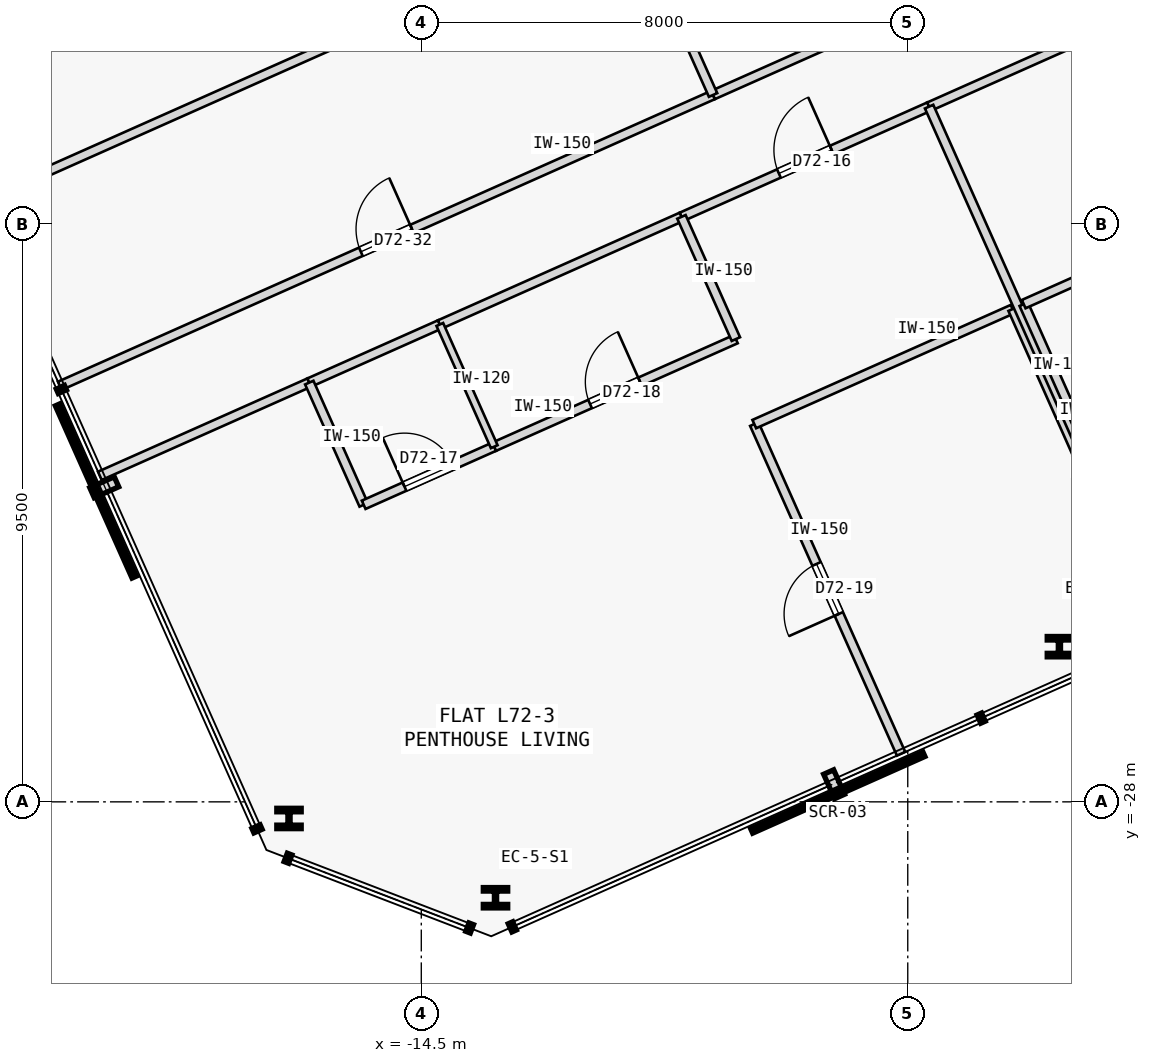
"""IFC4 building model, lengths in metres.
Left out: names, types, materials, properties, quantities, classifications, styles, units other than length and angle.
Written with IfcOpenShell. Run it as: python <this file> out.ifc"""

import sys

from ifc_helpers import new_model, si_unit, direction, frame, frame_2d, origin, origin_2d, place, context, subcontext, project, spatial, rectangle, i_section, extrude, element, fill, save


model = new_model("IFC4")
c1 = context("Model", 3, precision=1e-05, world=origin(), true_north=direction((0.0, 1.0)))
c2 = subcontext(c1, "Body", "Model", "MODEL_VIEW")
j1 = project(units=[si_unit("LENGTHUNIT", "METRE"), si_unit("PLANEANGLEUNIT", "RADIAN")], contexts=[c1])
p1 = place(None, origin())
s1 = spatial("IfcSite", under=j1, at=p1, CompositionType="ELEMENT")
p2 = place(p1, origin())
s2 = spatial("IfcBuilding", under=s1, at=p2, CompositionType="ELEMENT")
p3 = place(p2, frame((0.0, 0.0, 268.9)))
s3 = spatial("IfcBuildingStorey", under=s2, at=p3, CompositionType="ELEMENT", Elevation=268.9)
for number, where, z_axis, x_axis in (
    (1, (-13.28, -29.577, 0.0), (0.0, 0.0, 1.0), (1.0, 0.0, 0.0)),
    (2, (-4.006, -25.448, 0.0), (0.0, 0.0, 1.0), (1.0, 0.0, 0.0)),
    (3, (-16.676, -28.273, 0.0), (0.0, 0.0, 1.0), (1.0, 0.0, 0.0)),
):
    element("IfcColumn", number, at=place(p3, frame(where, z_axis=z_axis, x_axis=x_axis)), inside=s3, PredefinedType="COLUMN", context=c2, shape_type="SweptSolid", body=[
        extrude(i_section(OverallWidth=0.401, OverallDepth=0.335, WebThickness=0.036, FlangeThickness=0.058, FilletRadius=0.015, at=origin_2d()), origin(), (0.0, 0.0, 1.0), 3.35),
    ])
p4 = place(p3, frame((-19.786, -22.639, 0.0), z_axis=(0.0, 0.0, 1.0), x_axis=(0.913541633228, 0.406745232743, 0.0)))
e4 = element("IfcWall", 4, at=p4, inside=s3, PredefinedType="PARTITIONING", context=c2, shape_type="SweptSolid", body=[
    extrude(rectangle(XDim=3.77, YDim=0.15, at=frame_2d((1.885, 0.0))), origin(), (0.0, 0.0, 1.0), 3.125),
])
p5 = place(p3, frame((-10.221, -18.38, 0.0), z_axis=(0.0, 0.0, 1.0), x_axis=(0.913542602601, 0.406743055543, 0.0)))
e5 = element("IfcWall", 5, at=p5, inside=s3, PredefinedType="PARTITIONING", context=c2, shape_type="SweptSolid", body=[
    extrude(rectangle(XDim=4.458, YDim=0.15, at=frame_2d((2.229, 0.0))), origin(), (0.0, 0.0, 1.0), 3.125),
])
p6 = place(p5, frame((1.754, 0.0, 0.0)))
e6 = element("IfcOpeningElement", 6, at=p6, cuts=e5, PredefinedType="OPENING", context=c2, shape_type="SweptSolid", body=[
    extrude(rectangle(XDim=0.95, YDim=2.15, at=frame_2d((0.475, 1.075))), frame((0.0, 0.085, 0.0), z_axis=(0.0, -1.0, 0.0), x_axis=(1.0, 0.0, 0.0)), (0.0, 0.0, 1.0), 0.17),
])
p7 = place(p3, frame((-16.342, -21.105, 0.0), z_axis=(0.0, 0.0, 1.0), x_axis=(0.913558622212, 0.406707073682, 0.0)))
e7 = element("IfcWall", 7, at=p7, inside=s3, PredefinedType="PARTITIONING", context=c2, shape_type="SweptSolid", body=[
    extrude(rectangle(XDim=2.35, YDim=0.15, at=frame_2d((1.175, 0.0))), origin(), (0.0, 0.0, 1.0), 3.125),
])
p8 = place(p3, frame((-14.195, -20.149, 0.0), z_axis=(0.0, 0.0, 1.0), x_axis=(0.913545193015, 0.406737237438, 0.0)))
e8 = element("IfcWall", 8, at=p8, inside=s3, PredefinedType="PARTITIONING", context=c2, shape_type="SweptSolid", body=[
    extrude(rectangle(XDim=4.35, YDim=0.15, at=frame_2d((2.175, 0.0))), origin(), (0.0, 0.0, 1.0), 3.125),
])
p9 = place(p3, frame((-6.149, -16.567, 0.0), z_axis=(0.0, 0.0, 1.0), x_axis=(0.913543802, 0.40674036169, 0.0)))
e9 = element("IfcWall", 9, at=p9, inside=s3, PredefinedType="PARTITIONING", context=c2, shape_type="SweptSolid", body=[
    extrude(rectangle(XDim=3.65, YDim=0.15, at=frame_2d((1.825, 0.0))), origin(), (0.0, 0.0, 1.0), 3.125),
])
p10 = place(p3, frame((-20.445, -21.159, 0.0), z_axis=(0.0, 0.0, 1.0), x_axis=(0.913547681516, 0.406731648137, 0.0)))
e10 = element("IfcWall", 10, at=p10, inside=s3, PredefinedType="PARTITIONING", context=c2, shape_type="SweptSolid", body=[
    extrude(rectangle(XDim=11.76, YDim=0.15, at=frame_2d((5.88, 0.0))), origin(), (0.0, 0.0, 1.0), 3.125),
])
p11 = place(p10, frame((5.42, 0.0, 0.0)))
e11 = element("IfcOpeningElement", 11, at=p11, cuts=e10, PredefinedType="OPENING", context=c2, shape_type="SweptSolid", body=[
    extrude(rectangle(XDim=0.92, YDim=2.15, at=frame_2d((0.46, 1.075))), frame((0.0, 0.085, 0.0), z_axis=(0.0, -1.0, 0.0), x_axis=(1.0, 0.0, 0.0)), (0.0, 0.0, 1.0), 0.17),
])
p12 = place(p3, frame((-9.702, -16.375, 0.0), z_axis=(0.0, 0.0, 1.0), x_axis=(0.913552389019, 0.406721074594, 0.0)))
e12 = element("IfcWall", 12, at=p12, inside=s3, PredefinedType="PARTITIONING", context=c2, shape_type="SweptSolid", body=[
    extrude(rectangle(XDim=6.57, YDim=0.15, at=frame_2d((3.285, 0.0))), origin(), (0.0, 0.0, 1.0), 3.125),
])
p13 = place(p12, frame((2.825, 0.0, 0.0)))
e13 = element("IfcOpeningElement", 13, at=p13, cuts=e12, PredefinedType="OPENING", context=c2, shape_type="SweptSolid", body=[
    extrude(rectangle(XDim=0.92, YDim=2.15, at=frame_2d((0.46, 1.075))), frame((0.0, 0.085, 0.0), z_axis=(0.0, -1.0, 0.0), x_axis=(1.0, 0.0, 0.0)), (0.0, 0.0, 1.0), 0.17),
])
p14 = place(p3, frame((-15.448, -23.115, 0.0), z_axis=(0.0, 0.0, 1.0), x_axis=(-0.406725294076, 0.913550510459, 0.0)))
e14 = element("IfcWall", 14, at=p14, inside=s3, PredefinedType="PARTITIONING", context=c2, shape_type="SweptSolid", body=[
    extrude(rectangle(XDim=2.2, YDim=0.15, at=frame_2d((1.1, 0.0))), origin(), (0.0, 0.0, 1.0), 3.125),
])
p15 = place(p3, frame((-15.448, -23.115, 0.0), z_axis=(0.0, 0.0, 1.0), x_axis=(0.913558622212, 0.406707073682, 0.0)))
e15 = element("IfcWall", 15, at=p15, inside=s3, PredefinedType="PARTITIONING", context=c2, shape_type="SweptSolid", body=[
    extrude(rectangle(XDim=2.35, YDim=0.15, at=frame_2d((1.175, 0.0))), origin(), (0.0, 0.0, 1.0), 3.125),
])
p16 = place(p15, frame((0.735, 0.0, 0.0)))
e16 = element("IfcOpeningElement", 16, at=p16, cuts=e15, PredefinedType="OPENING", context=c2, shape_type="SweptSolid", body=[
    extrude(rectangle(XDim=0.88, YDim=2.15, at=frame_2d((0.44, 1.075))), frame((0.0, 0.085, 0.0), z_axis=(0.0, -1.0, 0.0), x_axis=(1.0, 0.0, 0.0)), (0.0, 0.0, 1.0), 0.17),
])
p17 = place(p3, frame((-13.301, -22.159, 0.0), z_axis=(0.0, 0.0, 1.0), x_axis=(0.913545193015, 0.406737237438, 0.0)))
e17 = element("IfcWall", 17, at=p17, inside=s3, PredefinedType="PARTITIONING", context=c2, shape_type="SweptSolid", body=[
    extrude(rectangle(XDim=4.35, YDim=0.15, at=frame_2d((2.175, 0.0))), origin(), (0.0, 0.0, 1.0), 3.125),
])
p18 = place(p17, frame((1.725, 0.0, 0.0)))
e18 = element("IfcOpeningElement", 18, at=p18, cuts=e17, PredefinedType="OPENING", context=c2, shape_type="SweptSolid", body=[
    extrude(rectangle(XDim=0.9, YDim=2.15, at=frame_2d((0.45, 1.075))), frame((0.0, 0.085, 0.0), z_axis=(0.0, -1.0, 0.0), x_axis=(1.0, 0.0, 0.0)), (0.0, 0.0, 1.0), 0.17),
])
p19 = place(p3, frame((-9.327, -20.39, 0.0), z_axis=(0.0, 0.0, 1.0), x_axis=(-0.406725294076, 0.913550510459, 0.0)))
e19 = element("IfcWall", 19, at=p19, inside=s3, PredefinedType="PARTITIONING", context=c2, shape_type="SweptSolid", body=[
    extrude(rectangle(XDim=2.2, YDim=0.15, at=frame_2d((1.1, 0.0))), origin(), (0.0, 0.0, 1.0), 3.125),
])
p20 = place(p3, frame((-6.61, -27.21, 0.0), z_axis=(0.0, 0.0, 1.0), x_axis=(-0.406699433793, 0.913562023375, 0.0)))
e20 = element("IfcWall", 20, at=p20, inside=s3, PredefinedType="PARTITIONING", context=c2, shape_type="SweptSolid", body=[
    extrude(rectangle(XDim=5.935, YDim=0.15, at=frame_2d((2.968, 0.0))), origin(), (0.0, 0.0, 1.0), 3.125),
])
p21 = place(p20, frame((2.518, 0.0, 0.0)))
e21 = element("IfcOpeningElement", 21, at=p21, cuts=e20, PredefinedType="OPENING", context=c2, shape_type="SweptSolid", body=[
    extrude(rectangle(XDim=0.9, YDim=2.15, at=frame_2d((0.45, 1.075))), frame((0.0, 0.085, 0.0), z_axis=(0.0, -1.0, 0.0), x_axis=(1.0, 0.0, 0.0)), (0.0, 0.0, 1.0), 0.17),
])
p22 = place(p3, frame((-9.024, -21.788, 0.0), z_axis=(0.0, 0.0, 1.0), x_axis=(0.913564558304, 0.406693739576, 0.0)))
e22 = element("IfcWall", 22, at=p22, inside=s3, PredefinedType="PARTITIONING", context=c2, shape_type="SweptSolid", body=[
    extrude(rectangle(XDim=4.65, YDim=0.15, at=frame_2d((2.325, 0.0))), origin(), (0.0, 0.0, 1.0), 3.125),
])
p23 = place(p3, frame((-2.362, -25.318, 0.0), z_axis=(0.0, 0.0, 1.0), x_axis=(-0.406714717734, 0.913555219119, 0.0)))
e23 = element("IfcWall", 23, at=p23, inside=s3, PredefinedType="PARTITIONING", context=c2, shape_type="SweptSolid", body=[
    extrude(rectangle(XDim=5.935, YDim=0.15, at=frame_2d((2.967, 0.0))), origin(), (0.0, 0.0, 1.0), 3.125),
])
p24 = place(p3, frame((-2.271, -25.278, 0.0), z_axis=(0.0, 0.0, 1.0), x_axis=(-0.406751296215, 0.913538933504, 0.0)))
e24 = element("IfcWall", 24, at=p24, inside=s3, PredefinedType="PARTITIONING", context=c2, shape_type="SweptSolid", body=[
    extrude(rectangle(XDim=9.535, YDim=0.15, at=frame_2d((4.768, 0.0))), origin(), (0.0, 0.0, 1.0), 3.125),
])
p25 = place(p3, frame((-13.301, -22.159, 0.0), z_axis=(0.0, 0.0, 1.0), x_axis=(-0.406725294076, 0.913550510459, 0.0)))
e25 = element("IfcWall", 25, at=p25, inside=s3, PredefinedType="PARTITIONING", context=c2, shape_type="SweptSolid", body=[
    extrude(rectangle(XDim=2.2, YDim=0.12, at=frame_2d((1.1, 0.0))), origin(), (0.0, 0.0, 1.0), 3.125),
])
p26 = place(p3, frame((-2.179, -25.237, 0.0), z_axis=(0.0, 0.0, 1.0), x_axis=(-0.406749048544, 0.913539934271, 0.0)))
e26 = element("IfcWall", 26, at=p26, inside=s3, PredefinedType="PARTITIONING", context=c2, shape_type="SweptSolid", body=[
    extrude(rectangle(XDim=5.935, YDim=0.15, at=frame_2d((2.968, 0.0))), origin(), (0.0, 0.0, 1.0), 3.125),
])
p27 = place(p3, frame((-4.593, -19.815, 0.0), z_axis=(0.0, 0.0, 1.0), x_axis=(0.91354505039, 0.40673755778, 0.0)))
e27 = element("IfcWall", 27, at=p27, inside=s3, PredefinedType="PARTITIONING", context=c2, shape_type="SweptSolid", body=[
    extrude(rectangle(XDim=4.65, YDim=0.15, at=frame_2d((2.325, 0.0))), origin(), (0.0, 0.0, 1.0), 3.125),
])
p28 = place(p3, frame((-21.789, -18.14, 0.0), z_axis=(0.0, 0.0, 1.0), x_axis=(0.913544247064, 0.406739362069, 0.0)))
e28 = element("IfcWall", 28, at=p28, inside=s3, PredefinedType="PARTITIONING", context=c2, shape_type="SweptSolid", body=[
    extrude(rectangle(XDim=11.76, YDim=0.15, at=frame_2d((5.88, 0.0))), origin(), (0.0, 0.0, 1.0), 3.125),
])
p29 = place(p3, frame((-9.702, -16.375, 0.0), z_axis=(0.0, 0.0, 1.0), x_axis=(-0.406740252054, 0.913543850813, 0.0)))
e29 = element("IfcWall", 29, at=p29, inside=s3, PredefinedType="PARTITIONING", context=c2, shape_type="SweptSolid", body=[
    extrude(rectangle(XDim=1.769, YDim=0.15, at=frame_2d((0.884, 0.0))), origin(), (0.0, 0.0, 1.0), 3.125),
])
p30 = place(p6, origin())
e30 = element("IfcDoor", 30, at=p30, inside=s3, OperationType="SINGLE_SWING_RIGHT", PredefinedType="DOOR", context=c2, shape_type="SweptSolid", body=[
    extrude(rectangle(XDim=0.95, YDim=2.15, at=frame_2d((0.475, 1.075))), frame((0.0, 0.025, 0.0), z_axis=(0.0, -1.0, 0.0), x_axis=(1.0, 0.0, 0.0)), (0.0, 0.0, 1.0), 0.05),
])
fill(e6, e30)
p31 = place(p16, origin())
e31 = element("IfcDoor", 31, at=p31, inside=s3, OperationType="SINGLE_SWING_LEFT", PredefinedType="DOOR", context=c2, shape_type="SweptSolid", body=[
    extrude(rectangle(XDim=0.88, YDim=2.15, at=frame_2d((0.44, 1.075))), frame((0.0, 0.025, 0.0), z_axis=(0.0, -1.0, 0.0), x_axis=(1.0, 0.0, 0.0)), (0.0, 0.0, 1.0), 0.05),
])
fill(e16, e31)
p32 = place(p18, origin())
e32 = element("IfcDoor", 32, at=p32, inside=s3, OperationType="SINGLE_SWING_RIGHT", PredefinedType="DOOR", context=c2, shape_type="SweptSolid", body=[
    extrude(rectangle(XDim=0.9, YDim=2.15, at=frame_2d((0.45, 1.075))), frame((0.0, 0.025, 0.0), z_axis=(0.0, -1.0, 0.0), x_axis=(1.0, 0.0, 0.0)), (0.0, 0.0, 1.0), 0.05),
])
fill(e18, e32)
p33 = place(p21, origin())
e33 = element("IfcDoor", 33, at=p33, inside=s3, OperationType="SINGLE_SWING_LEFT", PredefinedType="DOOR", context=c2, shape_type="SweptSolid", body=[
    extrude(rectangle(XDim=0.9, YDim=2.15, at=frame_2d((0.45, 1.075))), frame((0.0, 0.025, 0.0), z_axis=(0.0, -1.0, 0.0), x_axis=(1.0, 0.0, 0.0)), (0.0, 0.0, 1.0), 0.05),
])
fill(e21, e33)
p34 = place(p11, origin())
e34 = element("IfcDoor", 34, at=p34, inside=s3, OperationType="SINGLE_SWING_RIGHT", PredefinedType="DOOR", context=c2, shape_type="SweptSolid", body=[
    extrude(rectangle(XDim=0.92, YDim=2.15, at=frame_2d((0.46, 1.075))), frame((0.0, 0.025, 0.0), z_axis=(0.0, -1.0, 0.0), x_axis=(1.0, 0.0, 0.0)), (0.0, 0.0, 1.0), 0.05),
])
fill(e11, e34)
save(model, sys.argv[1])
